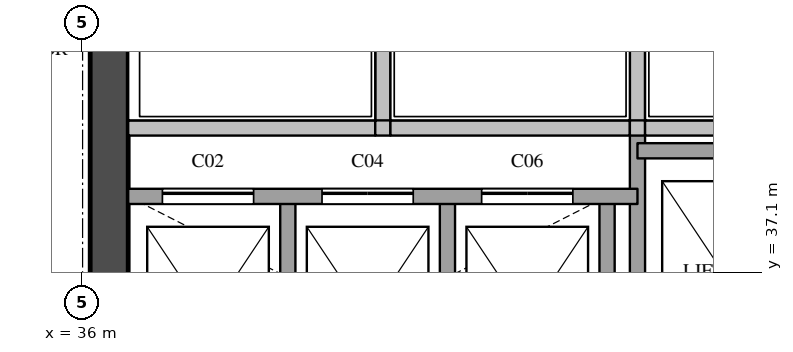
"""IFC4 building model, lengths in metres.
Left out: names, types, materials, properties, quantities, classifications, styles, units other than length and angle.
Written with IfcOpenShell. Run it as: python <this file> out.ifc"""

import sys

from ifc_helpers import new_model, si_unit, direction, frame, frame_2d, origin, place, context, subcontext, project, spatial, rectangle, extrude, element, fill, save


model = new_model("IFC4")
c1 = context("Model", 3, precision=1e-05, world=origin(), true_north=direction((0.0, 1.0)))
c2 = subcontext(c1, "Body", "Model", "MODEL_VIEW")
j1 = project(units=[si_unit("LENGTHUNIT", "METRE"), si_unit("PLANEANGLEUNIT", "RADIAN")], contexts=[c1])
p1 = place(None, origin())
s1 = spatial("IfcSite", under=j1, at=p1, CompositionType="ELEMENT")
p2 = place(p1, origin())
s2 = spatial("IfcBuilding", under=s1, at=p2, CompositionType="ELEMENT")
p3 = place(p2, frame((0.0, 0.0, 142.7)))
s3 = spatial("IfcBuildingStorey", under=s2, at=p3, CompositionType="ELEMENT", Elevation=142.7)
p4 = place(p3, frame((36.35, 29.1, 0.0), z_axis=(0.0, 0.0, 1.0), x_axis=(0.0, 1.0, 0.0)))
e1 = element("IfcWall", 1, at=p4, inside=s3, PredefinedType="SHEAR", context=c2, shape_type="SweptSolid", body=[
    extrude(rectangle(XDim=20.3, YDim=0.5, at=frame_2d((10.15, 0.0))), origin(), (0.0, 0.0, 1.0), 3.6),
])
p5 = place(p4, frame((3.6, 0.0, 0.0)))
e2 = element("IfcOpeningElement", 2, at=p5, cuts=e1, PredefinedType="OPENING", context=c2, shape_type="SweptSolid", body=[
    extrude(rectangle(XDim=1.8, YDim=2.1, at=frame_2d((0.9, 1.05))), frame((0.0, 0.26, 0.0), z_axis=(0.0, -1.0, 0.0), x_axis=(1.0, 0.0, 0.0)), (0.0, 0.0, 1.0), 0.52),
])
p6 = place(p4, frame((16.4, 0.0, 0.0)))
e3 = element("IfcOpeningElement", 3, at=p6, cuts=e1, PredefinedType="OPENING", context=c2, shape_type="SweptSolid", body=[
    extrude(rectangle(XDim=1.0, YDim=2.1, at=frame_2d((0.5, 1.05))), frame((0.0, 0.26, 0.0), z_axis=(0.0, -1.0, 0.0), x_axis=(1.0, 0.0, 0.0)), (0.0, 0.0, 1.0), 0.52),
])
p7 = place(p3, frame((38.7, 34.9, 0.0), z_axis=(0.0, 0.0, 1.0), x_axis=(0.0, 1.0, 0.0)))
e4 = element("IfcWall", 4, at=p7, inside=s3, PredefinedType="SOLIDWALL", context=c2, shape_type="SweptSolid", body=[
    extrude(rectangle(XDim=3.2, YDim=0.2, at=frame_2d((1.6, 0.0))), origin(), (0.0, 0.0, 1.0), 3.6),
])
p8 = place(p3, frame((39.95, 39.0, 0.0), z_axis=(0.0, 0.0, 1.0), x_axis=(0.0, 1.0, 0.0)))
e5 = element("IfcWall", 5, at=p8, inside=s3, PredefinedType="SOLIDWALL", context=c2, shape_type="SweptSolid", body=[
    extrude(rectangle(XDim=1.78, YDim=0.2, at=frame_2d((0.89, 0.0))), origin(), (0.0, 0.0, 1.0), 3.6),
])
for number, where, z_axis, x_axis in (
    (6, (40.8, 34.9, 0.0), (0.0, 0.0, 1.0), (0.0, 1.0, 0.0)),
    (7, (42.9, 34.9, 0.0), (0.0, 0.0, 1.0), (0.0, 1.0, 0.0)),
):
    element("IfcWall", number, at=place(p3, frame(where, z_axis=z_axis, x_axis=x_axis)), inside=s3, PredefinedType="SOLIDWALL", context=c2, shape_type="SweptSolid", body=[
        extrude(rectangle(XDim=3.2, YDim=0.2, at=frame_2d((1.6, 0.0))), origin(), (0.0, 0.0, 1.0), 3.6),
    ])
p9 = place(p3, frame((43.3, 29.1, 0.0), z_axis=(0.0, 0.0, 1.0), x_axis=(0.0, 1.0, 0.0)))
e8 = element("IfcWall", 8, at=p9, inside=s3, PredefinedType="SOLIDWALL", context=c2, shape_type="SweptSolid", body=[
    extrude(rectangle(XDim=9.9, YDim=0.2, at=frame_2d((4.95, 0.0))), origin(), (0.0, 0.0, 1.0), 3.6),
])
p10 = place(p3, frame((43.3, 39.0, 0.0), z_axis=(0.0, 0.0, 1.0), x_axis=(0.0, 1.0, 0.0)))
e9 = element("IfcWall", 9, at=p10, inside=s3, PredefinedType="SOLIDWALL", context=c2, shape_type="SweptSolid", body=[
    extrude(rectangle(XDim=1.78, YDim=0.2, at=frame_2d((0.89, 0.0))), origin(), (0.0, 0.0, 1.0), 3.6),
])
p11 = place(p3, frame((36.6, 38.1, 0.0), z_axis=(0.0, 0.0, 1.0), x_axis=(1.0, 0.0, 0.0)))
e10 = element("IfcWall", 10, at=p11, inside=s3, PredefinedType="SOLIDWALL", context=c2, shape_type="SweptSolid", body=[
    extrude(rectangle(XDim=6.7, YDim=0.2, at=frame_2d((3.35, 0.0))), origin(), (0.0, 0.0, 1.0), 3.6),
])
p12 = place(p11, frame((0.45, 0.0, 0.0)))
e11 = element("IfcOpeningElement", 11, at=p12, cuts=e10, PredefinedType="OPENING", context=c2, shape_type="SweptSolid", body=[
    extrude(rectangle(XDim=1.2, YDim=2.1, at=frame_2d((0.6, 1.05))), frame((0.0, 0.11, 0.0), z_axis=(0.0, -1.0, 0.0), x_axis=(1.0, 0.0, 0.0)), (0.0, 0.0, 1.0), 0.22),
])
p13 = place(p11, frame((2.55, 0.0, 0.0)))
e12 = element("IfcOpeningElement", 12, at=p13, cuts=e10, PredefinedType="OPENING", context=c2, shape_type="SweptSolid", body=[
    extrude(rectangle(XDim=1.2, YDim=2.1, at=frame_2d((0.6, 1.05))), frame((0.0, 0.11, 0.0), z_axis=(0.0, -1.0, 0.0), x_axis=(1.0, 0.0, 0.0)), (0.0, 0.0, 1.0), 0.22),
])
p14 = place(p11, frame((4.65, 0.0, 0.0)))
e13 = element("IfcOpeningElement", 13, at=p14, cuts=e10, PredefinedType="OPENING", context=c2, shape_type="SweptSolid", body=[
    extrude(rectangle(XDim=1.2, YDim=2.1, at=frame_2d((0.6, 1.05))), frame((0.0, 0.11, 0.0), z_axis=(0.0, -1.0, 0.0), x_axis=(1.0, 0.0, 0.0)), (0.0, 0.0, 1.0), 0.22),
])
p15 = place(p3, frame((43.3, 38.7, 0.0), z_axis=(0.0, 0.0, 1.0), x_axis=(1.0, 0.0, 0.0)))
e14 = element("IfcWall", 14, at=p15, inside=s3, PredefinedType="SOLIDWALL", context=c2, shape_type="SweptSolid", body=[
    extrude(rectangle(XDim=4.5, YDim=0.2, at=frame_2d((2.25, 0.0))), origin(), (0.0, 0.0, 1.0), 3.6),
])
p16 = place(p3, frame((36.6, 39.0, 0.0), z_axis=(0.0, 0.0, 1.0), x_axis=(1.0, 0.0, 0.0)))
e15 = element("IfcWall", 15, at=p16, inside=s3, PredefinedType="SOLIDWALL", context=c2, shape_type="SweptSolid", body=[
    extrude(rectangle(XDim=3.25, YDim=0.2, at=frame_2d((1.625, 0.0))), origin(), (0.0, 0.0, 1.0), 3.6),
])
p17 = place(p3, frame((39.85, 39.0, 0.0), z_axis=(0.0, 0.0, 1.0), x_axis=(1.0, 0.0, 0.0)))
e16 = element("IfcWall", 16, at=p17, inside=s3, PredefinedType="SOLIDWALL", context=c2, shape_type="SweptSolid", body=[
    extrude(rectangle(XDim=0.2, YDim=0.2, at=frame_2d((0.1, 0.0))), origin(), (0.0, 0.0, 1.0), 3.6),
])
p18 = place(p3, frame((40.05, 39.0, 0.0), z_axis=(0.0, 0.0, 1.0), x_axis=(1.0, 0.0, 0.0)))
e17 = element("IfcWall", 17, at=p18, inside=s3, PredefinedType="SOLIDWALL", context=c2, shape_type="SweptSolid", body=[
    extrude(rectangle(XDim=3.15, YDim=0.2, at=frame_2d((1.575, 0.0))), origin(), (0.0, 0.0, 1.0), 3.6),
])
p19 = place(p3, frame((43.2, 39.0, 0.0), z_axis=(0.0, 0.0, 1.0), x_axis=(1.0, 0.0, 0.0)))
e18 = element("IfcWall", 18, at=p19, inside=s3, PredefinedType="SOLIDWALL", context=c2, shape_type="SweptSolid", body=[
    extrude(rectangle(XDim=0.2, YDim=0.2, at=frame_2d((0.1, 0.0))), origin(), (0.0, 0.0, 1.0), 3.6),
])
p20 = place(p3, frame((43.4, 39.0, 0.0), z_axis=(0.0, 0.0, 1.0), x_axis=(1.0, 0.0, 0.0)))
e19 = element("IfcWall", 19, at=p20, inside=s3, PredefinedType="SOLIDWALL", context=c2, shape_type="SweptSolid", body=[
    extrude(rectangle(XDim=3.25, YDim=0.2, at=frame_2d((1.625, 0.0))), origin(), (0.0, 0.0, 1.0), 3.6),
])
p21 = place(p12, origin())
e20 = element("IfcDoor", 20, at=p21, inside=s3, OperationType="SLIDING_TO_LEFT", PredefinedType="DOOR", context=c2, shape_type="SweptSolid", body=[
    extrude(rectangle(XDim=1.2, YDim=2.1, at=frame_2d((0.6, 1.05))), frame((0.0, 0.025, 0.0), z_axis=(0.0, -1.0, 0.0), x_axis=(1.0, 0.0, 0.0)), (0.0, 0.0, 1.0), 0.05),
])
fill(e11, e20)
p22 = place(p13, origin())
e21 = element("IfcDoor", 21, at=p22, inside=s3, OperationType="SLIDING_TO_LEFT", PredefinedType="DOOR", context=c2, shape_type="SweptSolid", body=[
    extrude(rectangle(XDim=1.2, YDim=2.1, at=frame_2d((0.6, 1.05))), frame((0.0, 0.025, 0.0), z_axis=(0.0, -1.0, 0.0), x_axis=(1.0, 0.0, 0.0)), (0.0, 0.0, 1.0), 0.05),
])
fill(e12, e21)
p23 = place(p14, origin())
e22 = element("IfcDoor", 22, at=p23, inside=s3, OperationType="SLIDING_TO_LEFT", PredefinedType="DOOR", context=c2, shape_type="SweptSolid", body=[
    extrude(rectangle(XDim=1.2, YDim=2.1, at=frame_2d((0.6, 1.05))), frame((0.0, 0.025, 0.0), z_axis=(0.0, -1.0, 0.0), x_axis=(1.0, 0.0, 0.0)), (0.0, 0.0, 1.0), 0.05),
])
fill(e13, e22)
save(model, sys.argv[1])
